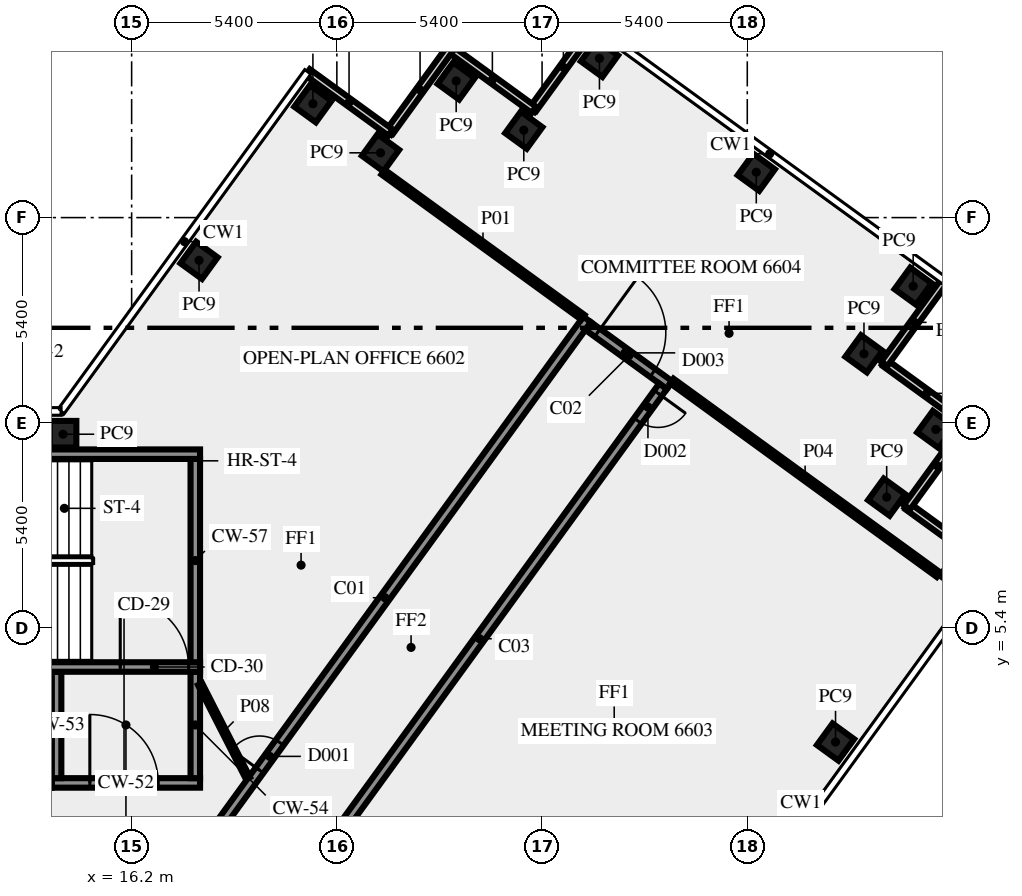
"""IFC4 building model, lengths in metres.
Left out: names, types, materials, properties, quantities, classifications, styles, units other than length and angle.
Written with IfcOpenShell. Run it as: python <this file> out.ifc"""

import sys

from ifc_helpers import new_model, si_unit, direction, frame, frame_2d, origin, origin_2d, place, context, subcontext, project, spatial, rectangle, extrude, element, fill, save


model = new_model("IFC4")
c1 = context("Model", 3, precision=1e-05, world=origin(), true_north=direction((0.0, 1.0)))
c2 = subcontext(c1, "Body", "Model", "MODEL_VIEW")
j1 = project(units=[si_unit("LENGTHUNIT", "METRE"), si_unit("PLANEANGLEUNIT", "RADIAN")], contexts=[c1])
p1 = place(None, origin())
s1 = spatial("IfcSite", under=j1, at=p1, CompositionType="ELEMENT")
p2 = place(p1, origin())
s2 = spatial("IfcBuilding", under=s1, at=p2, CompositionType="ELEMENT")
p3 = place(p2, frame((0.0, 0.0, 285.0)))
s3 = spatial("IfcBuildingStorey", under=s2, at=p3, CompositionType="ELEMENT", Elevation=285.0)
for number, where, z_axis, x_axis in (
    (1, (34.722, 2.4, 0.0), (0.0, 0.0, 1.0), (0.588, 0.809, 0.0)),
    (2, (37.96, 6.855, 0.0), (0.0, 0.0, 1.0), (0.588, 0.809, 0.0)),
    (3, (36.068, 8.844, 0.0), (0.0, 0.0, 1.0), (0.588, 0.809, 0.0)),
    (4, (37.36, 10.625, 0.0), (0.0, 0.0, 1.0), (0.588, 0.809, 0.0)),
    (5, (35.471, 12.616, 0.0), (0.0, 0.0, 1.0), (-0.809, 0.588, 0.0)),
    (6, (36.765, 14.395, 0.0), (0.0, 0.0, 1.0), (-0.809, 0.588, 0.0)),
    (7, (32.637, 17.393, 0.0), (0.0, 0.0, 1.0), (-0.809, 0.588, 0.0)),
    (8, (28.51, 20.39, 0.0), (0.0, 0.0, 1.0), (-0.588, -0.809, 0.0)),
    (9, (26.519, 18.5, 0.0), (0.0, 0.0, 1.0), (-0.809, 0.588, 0.0)),
    (10, (24.74, 19.795, 0.0), (0.0, 0.0, 1.0), (-0.588, -0.809, 0.0)),
    (11, (22.749, 17.904, 0.0), (0.0, 0.0, 1.0), (-0.588, -0.809, 0.0)),
    (12, (20.97, 19.195, 0.0), (0.0, 0.0, 1.0), (-0.588, -0.809, 0.0)),
    (13, (17.974, 15.075, 0.0), (0.0, 0.0, 1.0), (-0.588, -0.809, 0.0)),
    (14, (14.395, 10.5, 0.0), (0.0, 0.0, 1.0), (-1.0, 0.0, 0.0)),
):
    element("IfcColumn", number, at=place(p3, frame(where, z_axis=z_axis, x_axis=x_axis)), inside=s3, PredefinedType="COLUMN", context=c2, shape_type="SweptSolid", body=[
        extrude(rectangle(XDim=0.7, YDim=0.7, at=origin_2d()), origin(), (0.0, 0.0, 1.0), 3.65),
    ])
for number, where, z_axis, x_axis in (
    (15, (38.814, 7.01, 0.0), (0.0, 0.0, 1.0), (-0.809, 0.588, 0.0)),
    (16, (36.602, 8.58, 0.0), (0.0, 0.0, 1.0), (0.588, 0.809, 0.0)),
    (17, (38.216, 10.782, 0.0), (0.0, 0.0, 1.0), (-0.809, 0.588, 0.0)),
    (18, (36.005, 12.352, 0.0), (0.0, 0.0, 1.0), (0.588, 0.809, 0.0)),
):
    element("IfcWall", number, at=place(p3, frame(where, z_axis=z_axis, x_axis=x_axis)), inside=s3, PredefinedType="SOLIDWALL", context=c2, shape_type="SweptSolid", body=[
        extrude(rectangle(XDim=2.7, YDim=0.2, at=frame_2d((1.35, 0.0))), origin(), (0.0, 0.0, 1.0), 3.65),
    ])
for number, where, z_axis, x_axis in (
    (19, (28.354, 21.247, 0.0), (0.0, 0.0, 1.0), (-0.588, -0.809, 0.0)),
    (20, (26.785, 19.036, 0.0), (0.0, 0.0, 1.0), (-0.809, 0.588, 0.0)),
):
    element("IfcWall", number, at=place(p3, frame(where, z_axis=z_axis, x_axis=x_axis)), inside=s3, PredefinedType="SOLIDWALL", context=c2, shape_type="SweptSolid", body=[
        extrude(rectangle(XDim=2.7, YDim=0.2, at=frame_2d((1.35, 0.0))), origin(), (0.0, 0.0, 1.0), 3.65),
    ])
for number, where, z_axis, x_axis in (
    (21, (24.583, 20.65, 0.0), (0.0, 0.0, 1.0), (-0.588, -0.809, 0.0)),
    (22, (23.013, 18.438, 0.0), (0.0, 0.0, 1.0), (-0.809, 0.588, 0.0)),
):
    element("IfcWall", number, at=place(p3, frame(where, z_axis=z_axis, x_axis=x_axis)), inside=s3, PredefinedType="SOLIDWALL", context=c2, shape_type="SweptSolid", body=[
        extrude(rectangle(XDim=2.7, YDim=0.2, at=frame_2d((1.35, 0.0))), origin(), (0.0, 0.0, 1.0), 3.65),
    ])
p4 = place(p3, frame((14.1, 1.325, 0.0), z_axis=(0.0, 0.0, 1.0), x_axis=(1.0, 0.0, 0.0)))
e23 = element("IfcWall", 23, at=p4, inside=s3, PredefinedType="SHEAR", context=c2, shape_type="SweptSolid", body=[
    extrude(rectangle(XDim=3.9, YDim=0.25, at=frame_2d((1.95, 0.0))), origin(), (0.0, 0.0, 1.0), 3.65),
])
p5 = place(p4, frame((1.0, 0.0, 0.0)))
e24 = element("IfcOpeningElement", 24, at=p5, cuts=e23, PredefinedType="OPENING", context=c2, shape_type="SweptSolid", body=[
    extrude(rectangle(XDim=1.8, YDim=2.1, at=frame_2d((0.9, 1.05))), frame((0.0, 0.135, 0.0), z_axis=(0.0, -1.0, 0.0), x_axis=(1.0, 0.0, 0.0)), (0.0, 0.0, 1.0), 0.27),
])
for number, where, z_axis, x_axis in (
    (25, (14.225, 1.45, 0.0), (0.0, 0.0, 1.0), (0.0, 1.0, 0.0)),
    (26, (17.875, 1.45, 0.0), (0.0, 0.0, 1.0), (0.0, 1.0, 0.0)),
):
    element("IfcWall", number, at=place(p3, frame(where, z_axis=z_axis, x_axis=x_axis)), inside=s3, PredefinedType="SHEAR", context=c2, shape_type="SweptSolid", body=[
        extrude(rectangle(XDim=2.8, YDim=0.25, at=frame_2d((1.4, 0.0))), origin(), (0.0, 0.0, 1.0), 3.65),
    ])
p6 = place(p3, frame((7.5, 4.375, 0.0), z_axis=(0.0, 0.0, 1.0), x_axis=(1.0, 0.0, 0.0)))
e27 = element("IfcWall", 27, at=p6, inside=s3, PredefinedType="SHEAR", context=c2, shape_type="SweptSolid", body=[
    extrude(rectangle(XDim=10.5, YDim=0.25, at=frame_2d((5.25, 0.0))), origin(), (0.0, 0.0, 1.0), 3.65),
])
p7 = place(p6, frame((8.4, 0.0, 0.0)))
e28 = element("IfcOpeningElement", 28, at=p7, cuts=e27, PredefinedType="OPENING", context=c2, shape_type="SweptSolid", body=[
    extrude(rectangle(XDim=1.8, YDim=2.1, at=frame_2d((0.9, 1.05))), frame((0.0, 0.135, 0.0), z_axis=(0.0, -1.0, 0.0), x_axis=(1.0, 0.0, 0.0)), (0.0, 0.0, 1.0), 0.27),
])
p8 = place(p3, frame((17.875, 4.5, 0.0), z_axis=(0.0, 0.0, 1.0), x_axis=(0.0, 1.0, 0.0)))
e29 = element("IfcWall", 29, at=p8, inside=s3, PredefinedType="SHEAR", context=c2, shape_type="SweptSolid", body=[
    extrude(rectangle(XDim=5.35, YDim=0.25, at=frame_2d((2.675, 0.0))), origin(), (0.0, 0.0, 1.0), 3.65),
])
p9 = place(p3, frame((7.5, 9.975, 0.0), z_axis=(0.0, 0.0, 1.0), x_axis=(1.0, 0.0, 0.0)))
e30 = element("IfcWall", 30, at=p9, inside=s3, PredefinedType="SHEAR", context=c2, shape_type="SweptSolid", body=[
    extrude(rectangle(XDim=10.5, YDim=0.25, at=frame_2d((5.25, 0.0))), origin(), (0.0, 0.0, 1.0), 3.65),
])
p10 = place(p9, frame((2.0, 0.0, 1.0)))
e31 = element("IfcOpeningElement", 31, at=p10, cuts=e30, PredefinedType="OPENING", context=c2, shape_type="SweptSolid", body=[
    extrude(rectangle(XDim=1.2, YDim=1.2, at=frame_2d((0.6, 0.6))), frame((0.0, 0.135, 0.0), z_axis=(0.0, -1.0, 0.0), x_axis=(1.0, 0.0, 0.0)), (0.0, 0.0, 1.0), 0.27),
])
p11 = place(p3, frame((17.545, -1.125, 0.0), z_axis=(0.0, 0.0, 1.0), x_axis=(0.58779555165, 0.809009511354, 0.0)))
e32 = element("IfcWall", 32, at=p11, inside=s3, PredefinedType="SOLIDWALL", context=c2, shape_type="SweptSolid", body=[
    extrude(rectangle(XDim=18.103, YDim=0.25, at=frame_2d((9.052, 0.0))), origin(), (0.0, 0.0, 1.0), 3.65),
])
p12 = place(p11, frame((3.441, 0.0, 0.0)))
e33 = element("IfcOpeningElement", 33, at=p12, cuts=e32, PredefinedType="OPENING", context=c2, shape_type="SweptSolid", body=[
    extrude(rectangle(XDim=0.9, YDim=2.1, at=frame_2d((0.45, 1.05))), frame((0.0, 0.135, 0.0), z_axis=(0.0, -1.0, 0.0), x_axis=(1.0, 0.0, 0.0)), (0.0, 0.0, 1.0), 0.27),
])
p13 = place(p3, frame((28.213, 13.346, 0.0), z_axis=(0.0, 0.0, 1.0), x_axis=(0.809006914995, -0.587799125119, 0.0)))
e34 = element("IfcWall", 34, at=p13, inside=s3, PredefinedType="SOLIDWALL", context=c2, shape_type="SweptSolid", body=[
    extrude(rectangle(XDim=2.65, YDim=0.25, at=frame_2d((1.325, 0.0))), origin(), (0.0, 0.0, 1.0), 3.65),
])
p14 = place(p13, frame((0.3, 0.0, 0.0)))
e35 = element("IfcOpeningElement", 35, at=p14, cuts=e34, PredefinedType="OPENING", context=c2, shape_type="SweptSolid", body=[
    extrude(rectangle(XDim=1.8, YDim=2.1, at=frame_2d((0.9, 1.05))), frame((0.0, 0.135, 0.0), z_axis=(0.0, -1.0, 0.0), x_axis=(1.0, 0.0, 0.0)), (0.0, 0.0, 1.0), 0.27),
])
p15 = place(p3, frame((30.183, 11.761, 0.0), z_axis=(0.0, 0.0, 1.0), x_axis=(-0.587781762867, -0.80901952958, 0.0)))
e36 = element("IfcWall", 36, at=p15, inside=s3, PredefinedType="SOLIDWALL", context=c2, shape_type="SweptSolid", body=[
    extrude(rectangle(XDim=16.42, YDim=0.25, at=frame_2d((8.21, 0.0))), origin(), (0.0, 0.0, 1.0), 3.65),
])
p16 = place(p15, frame((0.225, 0.0, 0.0)))
e37 = element("IfcOpeningElement", 37, at=p16, cuts=e36, PredefinedType="OPENING", context=c2, shape_type="SweptSolid", body=[
    extrude(rectangle(XDim=0.9, YDim=2.1, at=frame_2d((0.45, 1.05))), frame((0.0, 0.135, 0.0), z_axis=(0.0, -1.0, 0.0), x_axis=(1.0, 0.0, 0.0)), (0.0, 0.0, 1.0), 0.27),
])
p17 = place(p3, frame((28.073, 13.578, 0.0), z_axis=(0.0, 0.0, 1.0), x_axis=(-0.809000932727, 0.587807358619, 0.0)))
e38 = element("IfcWall", 38, at=p17, inside=s3, PredefinedType="PARTITIONING", context=c2, shape_type="SweptSolid", body=[
    extrude(rectangle(XDim=6.496, YDim=0.15, at=frame_2d((3.248, 0.0))), origin(), (0.0, 0.0, 1.0), 3.65),
])
p18 = place(p3, frame((30.415, 11.902, 0.0), z_axis=(0.0, 0.0, 1.0), x_axis=(0.809020922653, -0.587779845444, 0.0)))
e39 = element("IfcWall", 39, at=p18, inside=s3, PredefinedType="PARTITIONING", context=c2, shape_type="SweptSolid", body=[
    extrude(rectangle(XDim=8.67, YDim=0.15, at=frame_2d((4.335, 0.0))), origin(), (0.0, 0.0, 1.0), 3.65),
])
p19 = place(p3, frame((18.0, 3.925, 0.0), z_axis=(0.0, 0.0, 1.0), x_axis=(0.453950796792, -0.891026752736, 0.0)))
e40 = element("IfcWall", 40, at=p19, inside=s3, PredefinedType="PARTITIONING", context=c2, shape_type="SweptSolid", body=[
    extrude(rectangle(XDim=2.778, YDim=0.12, at=frame_2d((1.389, 0.0))), origin(), (0.0, 0.0, 1.0), 3.65),
])
p20 = place(p5, origin())
e41 = element("IfcDoor", 41, at=p20, inside=s3, OperationType="DOUBLE_DOOR_SINGLE_SWING", PredefinedType="DOOR", context=c2, shape_type="SweptSolid", body=[
    extrude(rectangle(XDim=1.8, YDim=2.1, at=frame_2d((0.9, 1.05))), frame((0.0, 0.025, 0.0), z_axis=(0.0, -1.0, 0.0), x_axis=(1.0, 0.0, 0.0)), (0.0, 0.0, 1.0), 0.05),
])
fill(e24, e41)
p21 = place(p7, origin())
e42 = element("IfcDoor", 42, at=p21, inside=s3, OperationType="DOUBLE_DOOR_SINGLE_SWING", PredefinedType="DOOR", context=c2, shape_type="SweptSolid", body=[
    extrude(rectangle(XDim=1.8, YDim=2.1, at=frame_2d((0.9, 1.05))), frame((0.0, 0.025, 0.0), z_axis=(0.0, -1.0, 0.0), x_axis=(1.0, 0.0, 0.0)), (0.0, 0.0, 1.0), 0.05),
])
fill(e28, e42)
p22 = place(p12, origin())
e43 = element("IfcDoor", 43, at=p22, inside=s3, OperationType="SINGLE_SWING_LEFT", PredefinedType="DOOR", context=c2, shape_type="SweptSolid", body=[
    extrude(rectangle(XDim=0.9, YDim=2.1, at=frame_2d((0.45, 1.05))), frame((0.0, 0.025, 0.0), z_axis=(0.0, -1.0, 0.0), x_axis=(1.0, 0.0, 0.0)), (0.0, 0.0, 1.0), 0.05),
])
fill(e33, e43)
p23 = place(p14, origin())
e44 = element("IfcDoor", 44, at=p23, inside=s3, OperationType="DOUBLE_DOOR_SINGLE_SWING", PredefinedType="DOOR", context=c2, shape_type="SweptSolid", body=[
    extrude(rectangle(XDim=1.8, YDim=2.1, at=frame_2d((0.9, 1.05))), frame((0.0, 0.025, 0.0), z_axis=(0.0, -1.0, 0.0), x_axis=(1.0, 0.0, 0.0)), (0.0, 0.0, 1.0), 0.05),
])
fill(e35, e44)
p24 = place(p16, origin())
e45 = element("IfcDoor", 45, at=p24, inside=s3, OperationType="SINGLE_SWING_LEFT", PredefinedType="DOOR", context=c2, shape_type="SweptSolid", body=[
    extrude(rectangle(XDim=0.9, YDim=2.1, at=frame_2d((0.45, 1.05))), frame((0.0, 0.025, 0.0), z_axis=(0.0, -1.0, 0.0), x_axis=(1.0, 0.0, 0.0)), (0.0, 0.0, 1.0), 0.05),
])
fill(e37, e45)
save(model, sys.argv[1])
